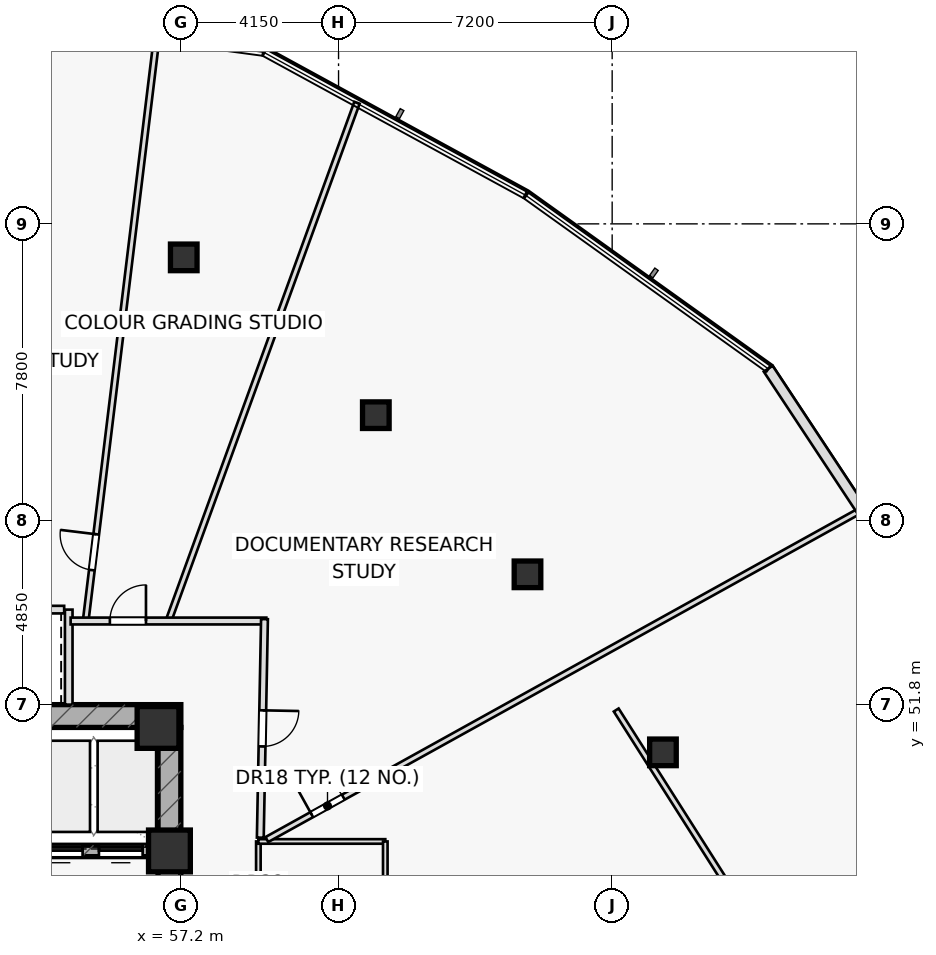
"""IFC4 building model, lengths in metres.
Left out: names, types, materials, properties, quantities, classifications, styles, units other than length and angle.
Written with IfcOpenShell. Run it as: python <this file> out.ifc"""

import sys

from ifc_helpers import new_model, si_unit, direction, frame, frame_2d, origin, origin_2d, place, context, subcontext, project, spatial, rectangle, hollow_rectangle, extrude, element, fill, save


model = new_model("IFC4")
c1 = context("Model", 3, precision=1e-05, world=origin(), true_north=direction((0.0, 1.0)))
c2 = subcontext(c1, "Body", "Model", "MODEL_VIEW")
j1 = project(units=[si_unit("LENGTHUNIT", "METRE"), si_unit("PLANEANGLEUNIT", "RADIAN")], contexts=[c1])
p1 = place(None, origin())
s1 = spatial("IfcSite", under=j1, at=p1, CompositionType="ELEMENT")
p2 = place(p1, origin())
s2 = spatial("IfcBuilding", under=s1, at=p2, CompositionType="ELEMENT")
p3 = place(p2, frame((0.0, 0.0, 150.25)))
s3 = spatial("IfcBuildingStorey", under=s2, at=p3, CompositionType="ELEMENT", Elevation=150.25)
p4 = place(p3, frame((42.8, 51.5, 0.0), z_axis=(0.0, 0.0, 1.0), x_axis=(1.0, 0.0, 0.0)))
e1 = element("IfcWall", 1, at=p4, inside=s3, PredefinedType="SHEAR", context=c2, shape_type="SweptSolid", body=[
    extrude(rectangle(XDim=14.4, YDim=0.6, at=frame_2d((7.2, 0.0))), origin(), (0.0, 0.0, 1.0), 3.55),
])
p5 = place(p4, frame((0.88, 0.0, 0.0)))
e2 = element("IfcOpeningElement", 2, at=p5, cuts=e1, PredefinedType="OPENING", context=c2, shape_type="SweptSolid", body=[
    extrude(rectangle(XDim=1.05, YDim=2.2, at=frame_2d((0.525, 1.1))), frame((0.0, 0.31, 0.0), z_axis=(0.0, -1.0, 0.0), x_axis=(1.0, 0.0, 0.0)), (0.0, 0.0, 1.0), 0.62),
])
p6 = place(p3, frame((56.9, 38.8, 0.0), z_axis=(0.0, 0.0, 1.0), x_axis=(0.0, 1.0, 0.0)))
e3 = element("IfcWall", 3, at=p6, inside=s3, PredefinedType="SHEAR", context=c2, shape_type="SweptSolid", body=[
    extrude(rectangle(XDim=12.4, YDim=0.6, at=frame_2d((6.2, 0.0))), origin(), (0.0, 0.0, 1.0), 3.55),
])
p7 = place(p6, frame((3.85, 0.0, 0.0)))
e4 = element("IfcOpeningElement", 4, at=p7, cuts=e3, PredefinedType="OPENING", context=c2, shape_type="SweptSolid", body=[
    extrude(rectangle(XDim=1.5, YDim=2.2, at=frame_2d((0.75, 1.1))), frame((0.0, 0.31, 0.0), z_axis=(0.0, -1.0, 0.0), x_axis=(1.0, 0.0, 0.0)), (0.0, 0.0, 1.0), 0.62),
])
p8 = place(p3, frame((43.4, 47.95, 0.0), z_axis=(0.0, 0.0, 1.0), x_axis=(1.0, 0.0, 0.0)))
e5 = element("IfcWall", 5, at=p8, inside=s3, PredefinedType="SHEAR", context=c2, shape_type="SweptSolid", body=[
    extrude(rectangle(XDim=13.2, YDim=0.3, at=frame_2d((6.6, 0.0))), origin(), (0.0, 0.0, 1.0), 3.55),
])
p9 = place(p8, frame((8.345, 0.0, 0.0)))
e6 = element("IfcOpeningElement", 6, at=p9, cuts=e5, PredefinedType="OPENING", context=c2, shape_type="SweptSolid", body=[
    extrude(rectangle(XDim=1.15, YDim=2.2, at=frame_2d((0.575, 1.1))), frame((0.0, 0.16, 0.0), z_axis=(0.0, -1.0, 0.0), x_axis=(1.0, 0.0, 0.0)), (0.0, 0.0, 1.0), 0.32),
])
p10 = place(p8, frame((10.065, 0.0, 0.0)))
e7 = element("IfcOpeningElement", 7, at=p10, cuts=e5, PredefinedType="OPENING", context=c2, shape_type="SweptSolid", body=[
    extrude(rectangle(XDim=1.15, YDim=2.2, at=frame_2d((0.575, 1.1))), frame((0.0, 0.16, 0.0), z_axis=(0.0, -1.0, 0.0), x_axis=(1.0, 0.0, 0.0)), (0.0, 0.0, 1.0), 0.32),
])
p11 = place(p8, frame((11.645, 0.0, 0.0)))
e8 = element("IfcOpeningElement", 8, at=p11, cuts=e5, PredefinedType="OPENING", context=c2, shape_type="SweptSolid", body=[
    extrude(rectangle(XDim=1.15, YDim=2.2, at=frame_2d((0.575, 1.1))), frame((0.0, 0.16, 0.0), z_axis=(0.0, -1.0, 0.0), x_axis=(1.0, 0.0, 0.0)), (0.0, 0.0, 1.0), 0.32),
])
for number, where, z_axis, x_axis in (
    (9, (56.9, 47.95, 0.0), (0.0, 0.0, 1.0), (1.0, 0.0, 0.0)),
    (10, (56.6, 51.2, 0.0), (0.0, 0.0, 1.0), (1.0, 0.0, 0.0)),
):
    element("IfcColumn", number, at=place(p3, frame(where, z_axis=z_axis, x_axis=x_axis)), inside=s3, PredefinedType="COLUMN", context=c2, shape_type="SweptSolid", body=[
        extrude(rectangle(XDim=1.1, YDim=1.1, at=origin_2d()), origin(), (0.0, 0.0, 1.0), 3.55),
    ])
for number, where, z_axis, x_axis in (
    (11, (69.886, 50.544, 0.0), (0.0, 0.0, 1.0), (1.0, 0.0, 0.0)),
    (12, (66.322, 55.229, 0.0), (0.0, 0.0, 1.0), (1.0, 0.0, 0.0)),
    (13, (62.331, 59.416, 0.0), (0.0, 0.0, 1.0), (1.0, 0.0, 0.0)),
    (14, (57.277, 63.568, 0.0), (0.0, 0.0, 1.0), (1.0, 0.0, 0.0)),
):
    element("IfcColumn", number, at=place(p3, frame(where, z_axis=z_axis, x_axis=x_axis)), inside=s3, PredefinedType="COLUMN", context=c2, shape_type="SweptSolid", body=[
        extrude(hollow_rectangle(XDim=0.7, YDim=0.7, WallThickness=0.04, at=origin_2d()), origin(), (0.0, 0.0, 1.0), 3.55),
    ])
p12 = place(p3, frame((54.25, 51.8, 0.0), z_axis=(0.0, 0.0, 1.0), x_axis=(0.0, 1.0, 0.0)))
e15 = element("IfcWall", 15, at=p12, inside=s3, PredefinedType="PARTITIONING", context=c2, shape_type="SweptSolid", body=[
    extrude(rectangle(XDim=2.5, YDim=0.2, at=frame_2d((1.25, 0.0))), origin(), (0.0, 0.0, 1.0), 3.55),
])
p13 = place(p3, frame((74.163, 42.993, 0.0), z_axis=(0.0, 0.0, 1.0), x_axis=(-0.53628142437, 0.844039237166, 0.0)))
e16 = element("IfcWall", 16, at=p13, inside=s3, PredefinedType="PARTITIONING", context=c2, shape_type="SweptSolid", body=[
    extrude(rectangle(XDim=10.267, YDim=0.15, at=frame_2d((5.133, 0.0))), origin(), (0.0, 0.0, 1.0), 2.835),
])
p14 = place(p3, frame((59.24, 41.2, 0.0), z_axis=(0.0, 0.0, 1.0), x_axis=(0.0, 1.0, 0.0)))
e17 = element("IfcWall", 17, at=p14, inside=s3, PredefinedType="PARTITIONING", context=c2, shape_type="SweptSolid", body=[
    extrude(rectangle(XDim=7.0, YDim=0.12, at=frame_2d((3.5, 0.0))), origin(), (0.0, 0.0, 1.0), 3.55),
])
p15 = place(p14, frame((1.15, 0.0, 0.0)))
e18 = element("IfcOpeningElement", 18, at=p15, cuts=e17, PredefinedType="OPENING", context=c2, shape_type="SweptSolid", body=[
    extrude(rectangle(XDim=0.9, YDim=2.05, at=frame_2d((0.45, 1.025))), frame((0.0, 0.07, 0.0), z_axis=(0.0, -1.0, 0.0), x_axis=(1.0, 0.0, 0.0)), (0.0, 0.0, 1.0), 0.14),
])
p16 = place(p14, frame((4.7, 0.0, 0.0)))
e19 = element("IfcOpeningElement", 19, at=p16, cuts=e17, PredefinedType="OPENING", context=c2, shape_type="SweptSolid", body=[
    extrude(rectangle(XDim=0.9, YDim=2.05, at=frame_2d((0.45, 1.025))), frame((0.0, 0.07, 0.0), z_axis=(0.0, -1.0, 0.0), x_axis=(1.0, 0.0, 0.0)), (0.0, 0.0, 1.0), 0.14),
])
p17 = place(p3, frame((59.24, 48.2, 0.0), z_axis=(0.0, 0.0, 1.0), x_axis=(1.0, 0.0, 0.0)))
e20 = element("IfcWall", 20, at=p17, inside=s3, PredefinedType="PARTITIONING", context=c2, shape_type="SweptSolid", body=[
    extrude(rectangle(XDim=3.34, YDim=0.12, at=frame_2d((1.67, 0.0))), origin(), (0.0, 0.0, 1.0), 3.55),
])
p18 = place(p3, frame((62.58, 41.2, 0.0), z_axis=(0.0, 0.0, 1.0), x_axis=(0.0, 1.0, 0.0)))
e21 = element("IfcWall", 21, at=p18, inside=s3, PredefinedType="PARTITIONING", context=c2, shape_type="SweptSolid", body=[
    extrude(rectangle(XDim=7.0, YDim=0.12, at=frame_2d((3.5, 0.0))), origin(), (0.0, 0.0, 1.0), 3.55),
])
p19 = place(p3, frame((59.463, 48.25, 0.0), z_axis=(0.0, 0.0, 1.0), x_axis=(0.87461815062, 0.48481242827, 0.0)))
e22 = element("IfcWall", 22, at=p19, inside=s3, PredefinedType="PARTITIONING", context=c2, shape_type="SweptSolid", body=[
    extrude(rectangle(XDim=17.901, YDim=0.15, at=frame_2d((8.95, 0.0))), origin(), (0.0, 0.0, 1.0), 2.835),
])
p20 = place(p19, frame((1.35, 0.0, 0.0)))
e23 = element("IfcOpeningElement", 23, at=p20, cuts=e22, PredefinedType="OPENING", context=c2, shape_type="SweptSolid", body=[
    extrude(rectangle(XDim=0.95, YDim=2.05, at=frame_2d((0.475, 1.025))), frame((0.0, 0.085, 0.0), z_axis=(0.0, -1.0, 0.0), x_axis=(1.0, 0.0, 0.0)), (0.0, 0.0, 1.0), 0.17),
])
p21 = place(p3, frame((56.874, 54.0, 0.0), z_axis=(0.0, 0.0, 1.0), x_axis=(0.341852479972, 0.939753628318, 0.0)))
e24 = element("IfcWall", 24, at=p21, inside=s3, PredefinedType="PARTITIONING", context=c2, shape_type="SweptSolid", body=[
    extrude(rectangle(XDim=14.511, YDim=0.15, at=frame_2d((7.256, 0.0))), origin(), (0.0, 0.0, 1.0), 2.835),
])
p22 = place(p3, frame((54.696, 54.0, 0.0), z_axis=(0.0, 0.0, 1.0), x_axis=(0.12085747381, 0.99266987011, 0.0)))
e25 = element("IfcWall", 25, at=p22, inside=s3, PredefinedType="PARTITIONING", context=c2, shape_type="SweptSolid", body=[
    extrude(rectangle(XDim=15.466, YDim=0.15, at=frame_2d((7.733, 0.0))), origin(), (0.0, 0.0, 1.0), 2.835),
])
p23 = place(p22, frame((1.35, 0.0, 0.0)))
e26 = element("IfcOpeningElement", 26, at=p23, cuts=e25, PredefinedType="OPENING", context=c2, shape_type="SweptSolid", body=[
    extrude(rectangle(XDim=0.95, YDim=2.05, at=frame_2d((0.475, 1.025))), frame((0.0, 0.085, 0.0), z_axis=(0.0, -1.0, 0.0), x_axis=(1.0, 0.0, 0.0)), (0.0, 0.0, 1.0), 0.17),
])
p24 = place(p3, frame((54.3, 54.0, 0.0), z_axis=(0.0, 0.0, 1.0), x_axis=(1.0, 0.0, 0.0)))
e27 = element("IfcWall", 27, at=p24, inside=s3, PredefinedType="PARTITIONING", context=c2, shape_type="SweptSolid", body=[
    extrude(rectangle(XDim=5.15, YDim=0.18, at=frame_2d((2.575, 0.0))), origin(), (0.0, 0.0, 1.0), 2.835),
])
p25 = place(p24, frame((1.033, 0.0, 0.0)))
e28 = element("IfcOpeningElement", 28, at=p25, cuts=e27, PredefinedType="OPENING", context=c2, shape_type="SweptSolid", body=[
    extrude(rectangle(XDim=0.95, YDim=2.05, at=frame_2d((0.475, 1.025))), frame((0.0, 0.1, 0.0), z_axis=(0.0, -1.0, 0.0), x_axis=(1.0, 0.0, 0.0)), (0.0, 0.0, 1.0), 0.2),
])
p26 = place(p3, frame((59.401, 54.05, 0.0), z_axis=(0.0, 0.0, 1.0), x_axis=(-0.019103170983, -0.999817517779, 0.0)))
e29 = element("IfcWall", 29, at=p26, inside=s3, PredefinedType="PARTITIONING", context=c2, shape_type="SweptSolid", body=[
    extrude(rectangle(XDim=5.751, YDim=0.18, at=frame_2d((2.875, 0.0))), origin(), (0.0, 0.0, 1.0), 2.835),
])
p27 = place(p26, frame((2.4, 0.0, 0.0)))
e30 = element("IfcOpeningElement", 30, at=p27, cuts=e29, PredefinedType="OPENING", context=c2, shape_type="SweptSolid", body=[
    extrude(rectangle(XDim=0.95, YDim=2.05, at=frame_2d((0.475, 1.025))), frame((0.0, 0.1, 0.0), z_axis=(0.0, -1.0, 0.0), x_axis=(1.0, 0.0, 0.0)), (0.0, 0.0, 1.0), 0.2),
])
p28 = place(p3, frame((77.353, 53.529, 0.0), z_axis=(0.0, 0.0, 1.0), x_axis=(-0.551124772076, 0.834422845807, 0.0)))
e31 = element("IfcWall", 31, at=p28, inside=s3, PredefinedType="STANDARD", context=c2, shape_type="SweptSolid", body=[
    extrude(rectangle(XDim=8.521, YDim=0.28, at=frame_2d((4.261, 0.0))), origin(), (0.0, 0.0, 1.0), 3.55),
])
p29 = place(p3, frame((45.82, 54.3, 0.0), z_axis=(0.0, 0.0, 1.0), x_axis=(1.0, 0.0, 0.0)))
e32 = element("IfcWall", 32, at=p29, inside=s3, PredefinedType="PARTITIONING", context=c2, shape_type="SweptSolid", body=[
    extrude(rectangle(XDim=8.31, YDim=0.2, at=frame_2d((4.155, 0.0))), origin(), (0.0, 0.0, 1.0), 3.55),
])
p30 = place(p20, origin())
e33 = element("IfcDoor", 33, at=p30, inside=s3, OperationType="SINGLE_SWING_LEFT", PredefinedType="DOOR", context=c2, shape_type="SweptSolid", body=[
    extrude(rectangle(XDim=0.95, YDim=2.05, at=frame_2d((0.475, 1.025))), frame((0.0, 0.025, 0.0), z_axis=(0.0, -1.0, 0.0), x_axis=(1.0, 0.0, 0.0)), (0.0, 0.0, 1.0), 0.05),
])
fill(e23, e33)
p31 = place(p23, origin())
e34 = element("IfcDoor", 34, at=p31, inside=s3, OperationType="SINGLE_SWING_RIGHT", PredefinedType="DOOR", context=c2, shape_type="SweptSolid", body=[
    extrude(rectangle(XDim=0.95, YDim=2.05, at=frame_2d((0.475, 1.025))), frame((0.0, 0.025, 0.0), z_axis=(0.0, -1.0, 0.0), x_axis=(1.0, 0.0, 0.0)), (0.0, 0.0, 1.0), 0.05),
])
fill(e26, e34)
p32 = place(p25, origin())
e35 = element("IfcDoor", 35, at=p32, inside=s3, OperationType="SINGLE_SWING_RIGHT", PredefinedType="DOOR", context=c2, shape_type="SweptSolid", body=[
    extrude(rectangle(XDim=0.95, YDim=2.05, at=frame_2d((0.475, 1.025))), frame((0.0, 0.025, 0.0), z_axis=(0.0, -1.0, 0.0), x_axis=(1.0, 0.0, 0.0)), (0.0, 0.0, 1.0), 0.05),
])
fill(e28, e35)
p33 = place(p27, origin())
e36 = element("IfcDoor", 36, at=p33, inside=s3, OperationType="SINGLE_SWING_LEFT", PredefinedType="DOOR", context=c2, shape_type="SweptSolid", body=[
    extrude(rectangle(XDim=0.95, YDim=2.05, at=frame_2d((0.475, 1.025))), frame((0.0, 0.025, 0.0), z_axis=(0.0, -1.0, 0.0), x_axis=(1.0, 0.0, 0.0)), (0.0, 0.0, 1.0), 0.05),
])
fill(e30, e36)
p34 = place(p10, origin())
e37 = element("IfcDoor", 37, at=p34, inside=s3, OperationType="SLIDING_TO_LEFT", PredefinedType="DOOR", context=c2, shape_type="SweptSolid", body=[
    extrude(rectangle(XDim=1.15, YDim=2.2, at=frame_2d((0.575, 1.1))), frame((0.0, 0.025, 0.0), z_axis=(0.0, -1.0, 0.0), x_axis=(1.0, 0.0, 0.0)), (0.0, 0.0, 1.0), 0.05),
])
fill(e7, e37)
p35 = place(p11, origin())
e38 = element("IfcDoor", 38, at=p35, inside=s3, OperationType="SLIDING_TO_LEFT", PredefinedType="DOOR", context=c2, shape_type="SweptSolid", body=[
    extrude(rectangle(XDim=1.15, YDim=2.2, at=frame_2d((0.575, 1.1))), frame((0.0, 0.025, 0.0), z_axis=(0.0, -1.0, 0.0), x_axis=(1.0, 0.0, 0.0)), (0.0, 0.0, 1.0), 0.05),
])
fill(e8, e38)
save(model, sys.argv[1])
